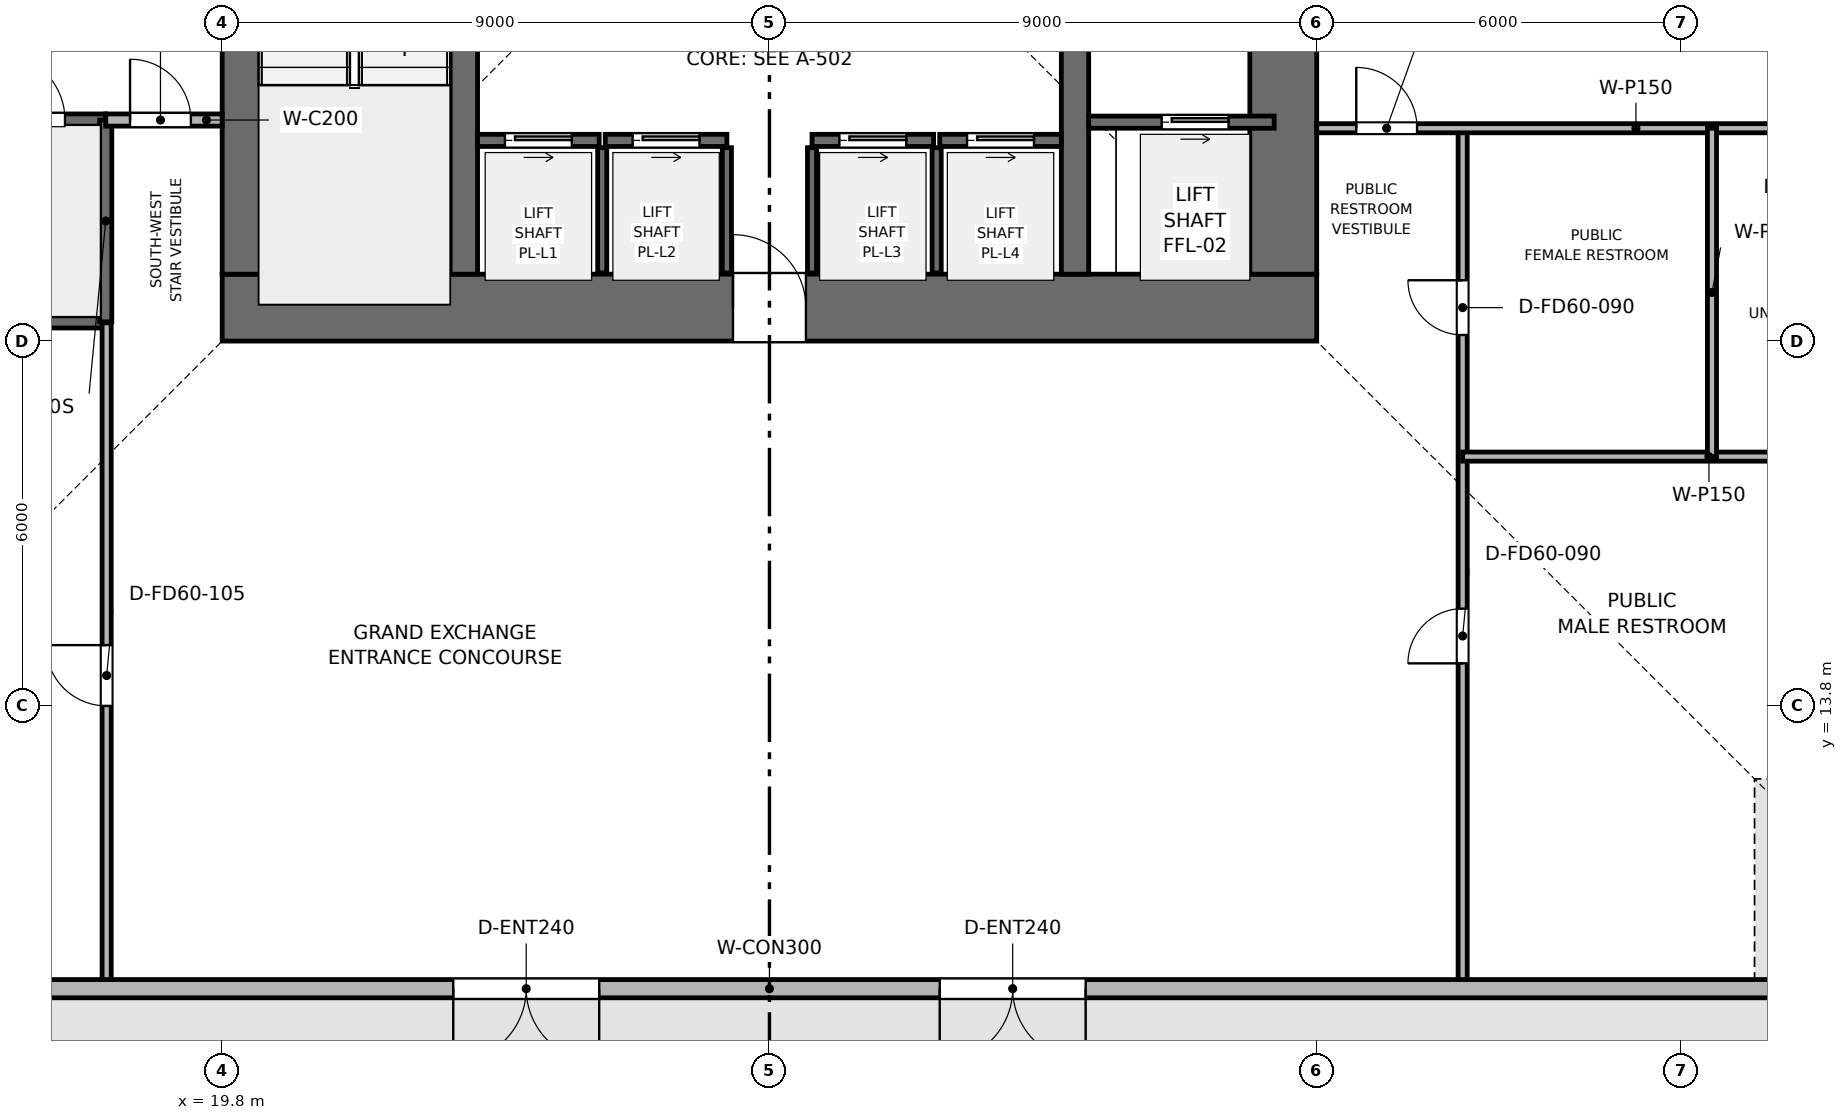
"""IFC4 building model, lengths in metres.
Left out: names, types, materials, properties, quantities, classifications, styles, units other than length and angle.
Written with IfcOpenShell. Run it as: python <this file> out.ifc"""

import sys

from ifc_helpers import new_model, si_unit, direction, frame, frame_2d, origin, place, context, subcontext, project, spatial, rectangle, extrude, element, fill, save


model = new_model("IFC4")
c1 = context("Model", 3, precision=1e-05, world=origin(), true_north=direction((0.0, 1.0)))
c2 = subcontext(c1, "Body", "Model", "MODEL_VIEW")
j1 = project(units=[si_unit("LENGTHUNIT", "METRE"), si_unit("PLANEANGLEUNIT", "RADIAN")], contexts=[c1])
p1 = place(None, origin())
s1 = spatial("IfcSite", under=j1, at=p1, CompositionType="ELEMENT")
p2 = place(p1, origin())
s2 = spatial("IfcBuilding", under=s1, at=p2, CompositionType="ELEMENT")
p3 = place(p2, origin())
s3 = spatial("IfcBuildingStorey", under=s2, at=p3, CompositionType="ELEMENT", Elevation=0.0)
p4 = place(p3, frame((19.8, 20.35, 0.0), z_axis=(0.0, 0.0, 1.0), x_axis=(1.0, 0.0, 0.0)))
e1 = element("IfcWall", 1, at=p4, inside=s3, PredefinedType="SHEAR", context=c2, shape_type="SweptSolid", body=[
    extrude(rectangle(XDim=18.0, YDim=1.1, at=frame_2d((9.0, 0.0))), origin(), (0.0, 0.0, 1.0), 8.4),
])
p5 = place(p4, frame((8.4, 0.0, 0.0)))
e2 = element("IfcOpeningElement", 2, at=p5, cuts=e1, PredefinedType="OPENING", context=c2, shape_type="SweptSolid", body=[
    extrude(rectangle(XDim=1.2, YDim=2.2, at=frame_2d((0.6, 1.1))), frame((0.0, 0.56, 0.0), z_axis=(0.0, -1.0, 0.0), x_axis=(1.0, 0.0, 0.0)), (0.0, 0.0, 1.0), 1.12),
])
p6 = place(p3, frame((20.35, 20.9, 0.0), z_axis=(0.0, 0.0, 1.0), x_axis=(0.0, 1.0, 0.0)))
e3 = element("IfcWall", 3, at=p6, inside=s3, PredefinedType="SHEAR", context=c2, shape_type="SweptSolid", body=[
    extrude(rectangle(XDim=15.8, YDim=1.1, at=frame_2d((7.9, 0.0))), origin(), (0.0, 0.0, 1.0), 8.4),
])
p7 = place(p6, frame((9.9, 0.0, 0.0)))
e4 = element("IfcOpeningElement", 4, at=p7, cuts=e3, PredefinedType="OPENING", context=c2, shape_type="SweptSolid", body=[
    extrude(rectangle(XDim=1.1, YDim=2.15, at=frame_2d((0.55, 1.075))), frame((0.0, 0.56, 0.0), z_axis=(0.0, -1.0, 0.0), x_axis=(1.0, 0.0, 0.0)), (0.0, 0.0, 1.0), 1.12),
])
p8 = place(p3, frame((37.25, 20.9, 0.0), z_axis=(0.0, 0.0, 1.0), x_axis=(0.0, 1.0, 0.0)))
e5 = element("IfcWall", 5, at=p8, inside=s3, PredefinedType="SHEAR", context=c2, shape_type="SweptSolid", body=[
    extrude(rectangle(XDim=15.8, YDim=1.1, at=frame_2d((7.9, 0.0))), origin(), (0.0, 0.0, 1.0), 8.4),
])
p9 = place(p8, frame((4.4, 0.0, 0.0)))
e6 = element("IfcOpeningElement", 6, at=p9, cuts=e5, PredefinedType="OPENING", context=c2, shape_type="SweptSolid", body=[
    extrude(rectangle(XDim=1.1, YDim=2.15, at=frame_2d((0.55, 1.075))), frame((0.0, 0.56, 0.0), z_axis=(0.0, -1.0, 0.0), x_axis=(1.0, 0.0, 0.0)), (0.0, 0.0, 1.0), 1.12),
])
for number, where, z_axis, x_axis in (
    (7, (23.775, 20.9, 0.0), (0.0, 0.0, 1.0), (0.0, 1.0, 0.0)),
    (8, (33.825, 20.9, 0.0), (0.0, 0.0, 1.0), (0.0, 1.0, 0.0)),
):
    element("IfcWall", number, at=place(p3, frame(where, z_axis=z_axis, x_axis=x_axis)), inside=s3, PredefinedType="SHEAR", context=c2, shape_type="SweptSolid", body=[
        extrude(rectangle(XDim=15.8, YDim=0.45, at=frame_2d((7.9, 0.0))), origin(), (0.0, 0.0, 1.0), 8.4),
    ])
p10 = place(p3, frame((46.2, 9.15, 0.0), z_axis=(0.0, 0.0, 1.0), x_axis=(-1.0, 0.0, 0.0)))
e9 = element("IfcWall", 9, at=p10, inside=s3, PredefinedType="SOLIDWALL", context=c2, shape_type="SweptSolid", body=[
    extrude(rectangle(XDim=34.8, YDim=0.3, at=frame_2d((17.4, 0.0))), origin(), (0.0, 0.0, 1.0), 8.05),
])
p11 = place(p10, frame((12.2, 0.0, 0.0)))
e10 = element("IfcOpeningElement", 10, at=p11, cuts=e9, PredefinedType="OPENING", context=c2, shape_type="SweptSolid", body=[
    extrude(rectangle(XDim=2.4, YDim=2.6, at=frame_2d((1.2, 1.3))), frame((0.0, 0.16, 0.0), z_axis=(0.0, -1.0, 0.0), x_axis=(1.0, 0.0, 0.0)), (0.0, 0.0, 1.0), 0.32),
])
p12 = place(p10, frame((20.2, 0.0, 0.0)))
e11 = element("IfcOpeningElement", 11, at=p12, cuts=e9, PredefinedType="OPENING", context=c2, shape_type="SweptSolid", body=[
    extrude(rectangle(XDim=2.4, YDim=2.6, at=frame_2d((1.2, 1.3))), frame((0.0, 0.16, 0.0), z_axis=(0.0, -1.0, 0.0), x_axis=(1.0, 0.0, 0.0)), (0.0, 0.0, 1.0), 0.32),
])
p13 = place(p3, frame((34.05, 23.4, 0.0), z_axis=(0.0, 0.0, 1.0), x_axis=(1.0, 0.0, 0.0)))
e12 = element("IfcWall", 12, at=p13, inside=s3, PredefinedType="SHEAR", context=c2, shape_type="SweptSolid", body=[
    extrude(rectangle(XDim=3.05, YDim=0.2, at=frame_2d((1.525, 0.0))), origin(), (0.0, 0.0, 1.0), 8.05),
])
p14 = place(p13, frame((1.2, 0.0, 0.0)))
e13 = element("IfcOpeningElement", 13, at=p14, cuts=e12, PredefinedType="OPENING", context=c2, shape_type="SweptSolid", body=[
    extrude(rectangle(XDim=1.1, YDim=2.15, at=frame_2d((0.55, 1.075))), frame((0.0, 0.11, 0.0), z_axis=(0.0, -1.0, 0.0), x_axis=(1.0, 0.0, 0.0)), (0.0, 0.0, 1.0), 0.22),
])
p15 = place(p3, frame((24.0, 23.1, 0.0), z_axis=(0.0, 0.0, 1.0), x_axis=(1.0, 0.0, 0.0)))
e14 = element("IfcWall", 14, at=p15, inside=s3, PredefinedType="SHEAR", context=c2, shape_type="SweptSolid", body=[
    extrude(rectangle(XDim=2.0, YDim=0.2, at=frame_2d((1.0, 0.0))), origin(), (0.0, 0.0, 1.0), 8.05),
])
p16 = place(p15, frame((0.45, 0.0, 0.0)))
e15 = element("IfcOpeningElement", 15, at=p16, cuts=e14, PredefinedType="OPENING", context=c2, shape_type="SweptSolid", body=[
    extrude(rectangle(XDim=1.1, YDim=2.15, at=frame_2d((0.55, 1.075))), frame((0.0, 0.11, 0.0), z_axis=(0.0, -1.0, 0.0), x_axis=(1.0, 0.0, 0.0)), (0.0, 0.0, 1.0), 0.22),
])
p17 = place(p3, frame((26.1, 23.1, 0.0), z_axis=(0.0, 0.0, 1.0), x_axis=(1.0, 0.0, 0.0)))
e16 = element("IfcWall", 16, at=p17, inside=s3, PredefinedType="SHEAR", context=c2, shape_type="SweptSolid", body=[
    extrude(rectangle(XDim=2.0, YDim=0.2, at=frame_2d((1.0, 0.0))), origin(), (0.0, 0.0, 1.0), 8.05),
])
p18 = place(p17, frame((0.45, 0.0, 0.0)))
e17 = element("IfcOpeningElement", 17, at=p18, cuts=e16, PredefinedType="OPENING", context=c2, shape_type="SweptSolid", body=[
    extrude(rectangle(XDim=1.1, YDim=2.15, at=frame_2d((0.55, 1.075))), frame((0.0, 0.11, 0.0), z_axis=(0.0, -1.0, 0.0), x_axis=(1.0, 0.0, 0.0)), (0.0, 0.0, 1.0), 0.22),
])
p19 = place(p3, frame((29.5, 23.1, 0.0), z_axis=(0.0, 0.0, 1.0), x_axis=(1.0, 0.0, 0.0)))
e18 = element("IfcWall", 18, at=p19, inside=s3, PredefinedType="SHEAR", context=c2, shape_type="SweptSolid", body=[
    extrude(rectangle(XDim=2.0, YDim=0.2, at=frame_2d((1.0, 0.0))), origin(), (0.0, 0.0, 1.0), 8.05),
])
p20 = place(p19, frame((0.45, 0.0, 0.0)))
e19 = element("IfcOpeningElement", 19, at=p20, cuts=e18, PredefinedType="OPENING", context=c2, shape_type="SweptSolid", body=[
    extrude(rectangle(XDim=1.1, YDim=2.15, at=frame_2d((0.55, 1.075))), frame((0.0, 0.11, 0.0), z_axis=(0.0, -1.0, 0.0), x_axis=(1.0, 0.0, 0.0)), (0.0, 0.0, 1.0), 0.22),
])
p21 = place(p3, frame((31.6, 23.1, 0.0), z_axis=(0.0, 0.0, 1.0), x_axis=(1.0, 0.0, 0.0)))
e20 = element("IfcWall", 20, at=p21, inside=s3, PredefinedType="SHEAR", context=c2, shape_type="SweptSolid", body=[
    extrude(rectangle(XDim=2.0, YDim=0.2, at=frame_2d((1.0, 0.0))), origin(), (0.0, 0.0, 1.0), 8.05),
])
p22 = place(p21, frame((0.45, 0.0, 0.0)))
e21 = element("IfcOpeningElement", 21, at=p22, cuts=e20, PredefinedType="OPENING", context=c2, shape_type="SweptSolid", body=[
    extrude(rectangle(XDim=1.1, YDim=2.15, at=frame_2d((0.55, 1.075))), frame((0.0, 0.11, 0.0), z_axis=(0.0, -1.0, 0.0), x_axis=(1.0, 0.0, 0.0)), (0.0, 0.0, 1.0), 0.22),
])
for number, where, z_axis, x_axis in (
    (22, (26.05, 20.92, 0.0), (0.0, 0.0, 1.0), (0.0, 1.0, 0.0)),
    (23, (28.1, 20.92, 0.0), (0.0, 0.0, 1.0), (0.0, 1.0, 0.0)),
    (24, (29.5, 20.92, 0.0), (0.0, 0.0, 1.0), (0.0, 1.0, 0.0)),
    (25, (31.55, 20.92, 0.0), (0.0, 0.0, 1.0), (0.0, 1.0, 0.0)),
):
    element("IfcWall", number, at=place(p3, frame(where, z_axis=z_axis, x_axis=x_axis)), inside=s3, PredefinedType="SHEAR", context=c2, shape_type="SweptSolid", body=[
        extrude(rectangle(XDim=2.06, YDim=0.15, at=frame_2d((1.03, 0.0))), origin(), (0.0, 0.0, 1.0), 8.05),
    ])
p23 = place(p3, frame((9.315, 23.435, 0.0), z_axis=(0.0, 0.0, 1.0), x_axis=(1.0, 0.0, 0.0)))
e26 = element("IfcWall", 26, at=p23, inside=s3, PredefinedType="SHEAR", context=c2, shape_type="SweptSolid", body=[
    extrude(rectangle(XDim=8.57, YDim=0.2, at=frame_2d((4.285, 0.0))), origin(), (0.0, 0.0, 1.0), 8.398),
])
p24 = place(p23, frame((6.8, 0.0, 0.0)))
e27 = element("IfcOpeningElement", 27, at=p24, cuts=e26, PredefinedType="OPENING", context=c2, shape_type="SweptSolid", body=[
    extrude(rectangle(XDim=1.1, YDim=2.15, at=frame_2d((0.55, 1.075))), frame((0.0, 0.11, 0.0), z_axis=(0.0, -1.0, 0.0), x_axis=(1.0, 0.0, 0.0)), (0.0, 0.0, 1.0), 0.22),
])
p25 = place(p3, frame((9.315, 20.115, 0.0), z_axis=(0.0, 0.0, 1.0), x_axis=(1.0, 0.0, 0.0)))
e28 = element("IfcWall", 28, at=p25, inside=s3, PredefinedType="SHEAR", context=c2, shape_type="SweptSolid", body=[
    extrude(rectangle(XDim=8.57, YDim=0.2, at=frame_2d((4.285, 0.0))), origin(), (0.0, 0.0, 1.0), 8.398),
])
p26 = place(p3, frame((17.885, 20.115, 0.0), z_axis=(0.0, 0.0, 1.0), x_axis=(0.0, 1.0, 0.0)))
e29 = element("IfcWall", 29, at=p26, inside=s3, PredefinedType="SHEAR", context=c2, shape_type="SweptSolid", body=[
    extrude(rectangle(XDim=3.32, YDim=0.2, at=frame_2d((1.66, 0.0))), origin(), (0.0, 0.0, 1.0), 8.398),
])
p27 = place(p3, frame((17.885, 23.435, 0.0), z_axis=(0.0, 0.0, 1.0), x_axis=(1.0, 0.0, 0.0)))
e30 = element("IfcWall", 30, at=p27, inside=s3, PredefinedType="PARTITIONING", context=c2, shape_type="SweptSolid", body=[
    extrude(rectangle(XDim=1.915, YDim=0.2, at=frame_2d((0.958, 0.0))), origin(), (0.0, 0.0, 1.0), 8.05),
])
p28 = place(p27, frame((0.4, 0.0, 0.0)))
e31 = element("IfcOpeningElement", 31, at=p28, cuts=e30, PredefinedType="OPENING", context=c2, shape_type="SweptSolid", body=[
    extrude(rectangle(XDim=1.0, YDim=2.15, at=frame_2d((0.5, 1.075))), frame((0.0, 0.11, 0.0), z_axis=(0.0, -1.0, 0.0), x_axis=(1.0, 0.0, 0.0)), (0.0, 0.0, 1.0), 0.22),
])
p29 = place(p3, frame((17.9, 9.3, 0.0), z_axis=(0.0, 0.0, 1.0), x_axis=(0.0, 1.0, 0.0)))
e32 = element("IfcWall", 32, at=p29, inside=s3, PredefinedType="PARTITIONING", context=c2, shape_type="SweptSolid", body=[
    extrude(rectangle(XDim=10.8, YDim=0.15, at=frame_2d((5.4, 0.0))), origin(), (0.0, 0.0, 1.0), 7.135),
])
p30 = place(p29, frame((4.5, 0.0, 0.0)))
e33 = element("IfcOpeningElement", 33, at=p30, cuts=e32, PredefinedType="OPENING", context=c2, shape_type="SweptSolid", body=[
    extrude(rectangle(XDim=1.0, YDim=2.15, at=frame_2d((0.5, 1.075))), frame((0.0, 0.085, 0.0), z_axis=(0.0, -1.0, 0.0), x_axis=(1.0, 0.0, 0.0)), (0.0, 0.0, 1.0), 0.17),
])
p31 = place(p3, frame((40.2, 9.3, 0.0), z_axis=(0.0, 0.0, 1.0), x_axis=(0.0, 1.0, 0.0)))
e34 = element("IfcWall", 34, at=p31, inside=s3, PredefinedType="PARTITIONING", context=c2, shape_type="SweptSolid", body=[
    extrude(rectangle(XDim=14.0, YDim=0.15, at=frame_2d((7.0, 0.0))), origin(), (0.0, 0.0, 1.0), 7.135),
])
p32 = place(p31, frame((5.2, 0.0, 0.0)))
e35 = element("IfcOpeningElement", 35, at=p32, cuts=e34, PredefinedType="OPENING", context=c2, shape_type="SweptSolid", body=[
    extrude(rectangle(XDim=0.9, YDim=2.1, at=frame_2d((0.45, 1.05))), frame((0.0, 0.085, 0.0), z_axis=(0.0, -1.0, 0.0), x_axis=(1.0, 0.0, 0.0)), (0.0, 0.0, 1.0), 0.17),
])
p33 = place(p31, frame((10.6, 0.0, 0.0)))
e36 = element("IfcOpeningElement", 36, at=p33, cuts=e34, PredefinedType="OPENING", context=c2, shape_type="SweptSolid", body=[
    extrude(rectangle(XDim=0.9, YDim=2.1, at=frame_2d((0.45, 1.05))), frame((0.0, 0.085, 0.0), z_axis=(0.0, -1.0, 0.0), x_axis=(1.0, 0.0, 0.0)), (0.0, 0.0, 1.0), 0.17),
])
p34 = place(p3, frame((37.8, 23.3, 0.0), z_axis=(0.0, 0.0, 1.0), x_axis=(1.0, 0.0, 0.0)))
e37 = element("IfcWall", 37, at=p34, inside=s3, PredefinedType="PARTITIONING", context=c2, shape_type="SweptSolid", body=[
    extrude(rectangle(XDim=10.5, YDim=0.15, at=frame_2d((5.25, 0.0))), origin(), (0.0, 0.0, 1.0), 8.05),
])
p35 = place(p34, frame((0.65, 0.0, 0.0)))
e38 = element("IfcOpeningElement", 38, at=p35, cuts=e37, PredefinedType="OPENING", context=c2, shape_type="SweptSolid", body=[
    extrude(rectangle(XDim=1.0, YDim=2.15, at=frame_2d((0.5, 1.075))), frame((0.0, 0.085, 0.0), z_axis=(0.0, -1.0, 0.0), x_axis=(1.0, 0.0, 0.0)), (0.0, 0.0, 1.0), 0.17),
])
p36 = place(p34, frame((7.8, 0.0, 0.0)))
e39 = element("IfcOpeningElement", 39, at=p36, cuts=e37, PredefinedType="OPENING", context=c2, shape_type="SweptSolid", body=[
    extrude(rectangle(XDim=1.0, YDim=2.15, at=frame_2d((0.5, 1.075))), frame((0.0, 0.085, 0.0), z_axis=(0.0, -1.0, 0.0), x_axis=(1.0, 0.0, 0.0)), (0.0, 0.0, 1.0), 0.17),
])
p37 = place(p3, frame((40.2, 17.9, 0.0), z_axis=(0.0, 0.0, 1.0), x_axis=(1.0, 0.0, 0.0)))
e40 = element("IfcWall", 40, at=p37, inside=s3, PredefinedType="PARTITIONING", context=c2, shape_type="SweptSolid", body=[
    extrude(rectangle(XDim=8.1, YDim=0.15, at=frame_2d((4.05, 0.0))), origin(), (0.0, 0.0, 1.0), 8.05),
])
p38 = place(p3, frame((44.3, 17.9, 0.0), z_axis=(0.0, 0.0, 1.0), x_axis=(0.0, 1.0, 0.0)))
e41 = element("IfcWall", 41, at=p38, inside=s3, PredefinedType="PARTITIONING", context=c2, shape_type="SweptSolid", body=[
    extrude(rectangle(XDim=5.4, YDim=0.15, at=frame_2d((2.7, 0.0))), origin(), (0.0, 0.0, 1.0), 8.05),
])
p39 = place(p11, origin())
e42 = element("IfcDoor", 42, at=p39, inside=s3, OperationType="DOUBLE_DOOR_SINGLE_SWING", PredefinedType="DOOR", context=c2, shape_type="SweptSolid", body=[
    extrude(rectangle(XDim=2.4, YDim=2.6, at=frame_2d((1.2, 1.3))), frame((0.0, 0.025, 0.0), z_axis=(0.0, -1.0, 0.0), x_axis=(1.0, 0.0, 0.0)), (0.0, 0.0, 1.0), 0.05),
])
fill(e10, e42)
p40 = place(p12, origin())
e43 = element("IfcDoor", 43, at=p40, inside=s3, OperationType="DOUBLE_DOOR_SINGLE_SWING", PredefinedType="DOOR", context=c2, shape_type="SweptSolid", body=[
    extrude(rectangle(XDim=2.4, YDim=2.6, at=frame_2d((1.2, 1.3))), frame((0.0, 0.025, 0.0), z_axis=(0.0, -1.0, 0.0), x_axis=(1.0, 0.0, 0.0)), (0.0, 0.0, 1.0), 0.05),
])
fill(e11, e43)
p41 = place(p14, origin())
e44 = element("IfcDoor", 44, at=p41, inside=s3, OperationType="SLIDING_TO_RIGHT", PredefinedType="DOOR", context=c2, shape_type="SweptSolid", body=[
    extrude(rectangle(XDim=1.1, YDim=2.15, at=frame_2d((0.55, 1.075))), frame((0.0, 0.025, 0.0), z_axis=(0.0, -1.0, 0.0), x_axis=(1.0, 0.0, 0.0)), (0.0, 0.0, 1.0), 0.05),
])
fill(e13, e44)
p42 = place(p16, origin())
e45 = element("IfcDoor", 45, at=p42, inside=s3, OperationType="SLIDING_TO_RIGHT", PredefinedType="DOOR", context=c2, shape_type="SweptSolid", body=[
    extrude(rectangle(XDim=1.1, YDim=2.15, at=frame_2d((0.55, 1.075))), frame((0.0, 0.025, 0.0), z_axis=(0.0, -1.0, 0.0), x_axis=(1.0, 0.0, 0.0)), (0.0, 0.0, 1.0), 0.05),
])
fill(e15, e45)
p43 = place(p18, origin())
e46 = element("IfcDoor", 46, at=p43, inside=s3, OperationType="SLIDING_TO_RIGHT", PredefinedType="DOOR", context=c2, shape_type="SweptSolid", body=[
    extrude(rectangle(XDim=1.1, YDim=2.15, at=frame_2d((0.55, 1.075))), frame((0.0, 0.025, 0.0), z_axis=(0.0, -1.0, 0.0), x_axis=(1.0, 0.0, 0.0)), (0.0, 0.0, 1.0), 0.05),
])
fill(e17, e46)
p44 = place(p20, origin())
e47 = element("IfcDoor", 47, at=p44, inside=s3, OperationType="SLIDING_TO_RIGHT", PredefinedType="DOOR", context=c2, shape_type="SweptSolid", body=[
    extrude(rectangle(XDim=1.1, YDim=2.15, at=frame_2d((0.55, 1.075))), frame((0.0, 0.025, 0.0), z_axis=(0.0, -1.0, 0.0), x_axis=(1.0, 0.0, 0.0)), (0.0, 0.0, 1.0), 0.05),
])
fill(e19, e47)
p45 = place(p22, origin())
e48 = element("IfcDoor", 48, at=p45, inside=s3, OperationType="SLIDING_TO_RIGHT", PredefinedType="DOOR", context=c2, shape_type="SweptSolid", body=[
    extrude(rectangle(XDim=1.1, YDim=2.15, at=frame_2d((0.55, 1.075))), frame((0.0, 0.025, 0.0), z_axis=(0.0, -1.0, 0.0), x_axis=(1.0, 0.0, 0.0)), (0.0, 0.0, 1.0), 0.05),
])
fill(e21, e48)
p46 = place(p24, origin())
e49 = element("IfcDoor", 49, at=p46, inside=s3, OperationType="SINGLE_SWING_LEFT", PredefinedType="DOOR", context=c2, shape_type="SweptSolid", body=[
    extrude(rectangle(XDim=1.1, YDim=2.15, at=frame_2d((0.55, 1.075))), frame((0.0, 0.025, 0.0), z_axis=(0.0, -1.0, 0.0), x_axis=(1.0, 0.0, 0.0)), (0.0, 0.0, 1.0), 0.05),
])
fill(e27, e49)
p47 = place(p28, origin())
e50 = element("IfcDoor", 50, at=p47, inside=s3, OperationType="SINGLE_SWING_LEFT", PredefinedType="DOOR", context=c2, shape_type="SweptSolid", body=[
    extrude(rectangle(XDim=1.0, YDim=2.15, at=frame_2d((0.5, 1.075))), frame((0.0, 0.025, 0.0), z_axis=(0.0, -1.0, 0.0), x_axis=(1.0, 0.0, 0.0)), (0.0, 0.0, 1.0), 0.05),
])
fill(e31, e50)
p48 = place(p30, origin())
e51 = element("IfcDoor", 51, at=p48, inside=s3, OperationType="SINGLE_SWING_RIGHT", PredefinedType="DOOR", context=c2, shape_type="SweptSolid", body=[
    extrude(rectangle(XDim=1.0, YDim=2.15, at=frame_2d((0.5, 1.075))), frame((0.0, 0.025, 0.0), z_axis=(0.0, -1.0, 0.0), x_axis=(1.0, 0.0, 0.0)), (0.0, 0.0, 1.0), 0.05),
])
fill(e33, e51)
p49 = place(p32, origin())
e52 = element("IfcDoor", 52, at=p49, inside=s3, OperationType="SINGLE_SWING_LEFT", PredefinedType="DOOR", context=c2, shape_type="SweptSolid", body=[
    extrude(rectangle(XDim=0.9, YDim=2.1, at=frame_2d((0.45, 1.05))), frame((0.0, 0.025, 0.0), z_axis=(0.0, -1.0, 0.0), x_axis=(1.0, 0.0, 0.0)), (0.0, 0.0, 1.0), 0.05),
])
fill(e35, e52)
p50 = place(p33, origin())
e53 = element("IfcDoor", 53, at=p50, inside=s3, OperationType="SINGLE_SWING_RIGHT", PredefinedType="DOOR", context=c2, shape_type="SweptSolid", body=[
    extrude(rectangle(XDim=0.9, YDim=2.1, at=frame_2d((0.45, 1.05))), frame((0.0, 0.025, 0.0), z_axis=(0.0, -1.0, 0.0), x_axis=(1.0, 0.0, 0.0)), (0.0, 0.0, 1.0), 0.05),
])
fill(e36, e53)
p51 = place(p35, origin())
e54 = element("IfcDoor", 54, at=p51, inside=s3, OperationType="SINGLE_SWING_LEFT", PredefinedType="DOOR", context=c2, shape_type="SweptSolid", body=[
    extrude(rectangle(XDim=1.0, YDim=2.15, at=frame_2d((0.5, 1.075))), frame((0.0, 0.025, 0.0), z_axis=(0.0, -1.0, 0.0), x_axis=(1.0, 0.0, 0.0)), (0.0, 0.0, 1.0), 0.05),
])
fill(e38, e54)
p52 = place(p5, origin())
e55 = element("IfcDoor", 55, at=p52, inside=s3, OperationType="SINGLE_SWING_LEFT", PredefinedType="DOOR", context=c2, shape_type="SweptSolid", body=[
    extrude(rectangle(XDim=1.2, YDim=2.2, at=frame_2d((0.6, 1.1))), frame((0.0, 0.025, 0.0), z_axis=(0.0, -1.0, 0.0), x_axis=(1.0, 0.0, 0.0)), (0.0, 0.0, 1.0), 0.05),
])
fill(e2, e55)
save(model, sys.argv[1])
